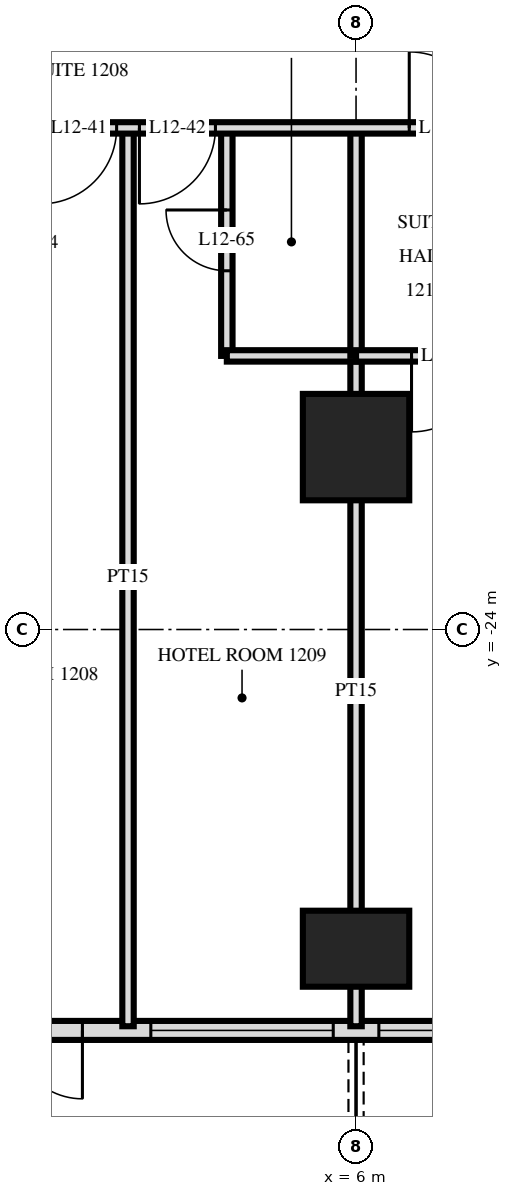
"""IFC4 building model, lengths in metres.
Left out: names, types, materials, properties, quantities, classifications, styles, units other than length and angle.
Written with IfcOpenShell. Run it as: python <this file> out.ifc"""

import sys

from ifc_helpers import new_model, si_unit, direction, frame, frame_2d, origin, origin_2d, place, context, subcontext, project, spatial, rectangle, extrude, element, fill, save


model = new_model("IFC4")
c1 = context("Model", 3, precision=1e-05, world=origin(), true_north=direction((0.0, 1.0)))
c2 = subcontext(c1, "Body", "Model", "MODEL_VIEW")
j1 = project(units=[si_unit("LENGTHUNIT", "METRE"), si_unit("PLANEANGLEUNIT", "RADIAN")], contexts=[c1])
p1 = place(None, origin())
s1 = spatial("IfcSite", under=j1, at=p1, CompositionType="ELEMENT")
p2 = place(p1, origin())
s2 = spatial("IfcBuilding", under=s1, at=p2, CompositionType="ELEMENT")
p3 = place(p2, frame((0.0, 0.0, 52.8)))
s3 = spatial("IfcBuildingStorey", under=s2, at=p3, CompositionType="ELEMENT", Elevation=52.8)
p4 = place(p3, frame((6.0, -28.2, 0.0), z_axis=(0.0, 0.0, 1.0), x_axis=(1.0, 0.0, 0.0)))
e1 = element("IfcColumn", 1, at=p4, inside=s3, PredefinedType="COLUMN", context=c2, shape_type="SweptSolid", body=[
    extrude(rectangle(XDim=1.4, YDim=1.0, at=origin_2d()), origin(), (0.0, 0.0, 1.0), 3.6),
])
p5 = place(p3, frame((6.0, -21.6, 0.0), z_axis=(0.0, 0.0, 1.0), x_axis=(1.0, 0.0, 0.0)))
e2 = element("IfcColumn", 2, at=p5, inside=s3, PredefinedType="COLUMN", context=c2, shape_type="SweptSolid", body=[
    extrude(rectangle(XDim=1.4, YDim=1.4, at=origin_2d()), origin(), (0.0, 0.0, 1.0), 3.6),
])
p6 = place(p3, frame((-28.775, -29.275, 0.0), z_axis=(0.0, 0.0, 1.0), x_axis=(1.0, 0.0, 0.0)))
e3 = element("IfcWall", 3, at=p6, inside=s3, PredefinedType="SOLIDWALL", context=c2, shape_type="SweptSolid", body=[
    extrude(rectangle(XDim=57.551, YDim=0.25, at=frame_2d((28.775, 0.0))), origin(), (0.0, 0.0, 1.0), 3.32),
])
p7 = place(p6, frame((0.575, 0.0, 0.0)))
e4 = element("IfcOpeningElement", 4, at=p7, cuts=e3, PredefinedType="OPENING", context=c2, shape_type="SweptSolid", body=[
    extrude(rectangle(XDim=1.8, YDim=2.4, at=frame_2d((0.9, 1.2))), frame((0.0, 0.135, 0.0), z_axis=(0.0, -1.0, 0.0), x_axis=(1.0, 0.0, 0.0)), (0.0, 0.0, 1.0), 0.27),
])
p8 = place(p6, frame((5.375, 0.0, 0.0)))
e5 = element("IfcOpeningElement", 5, at=p8, cuts=e3, PredefinedType="OPENING", context=c2, shape_type="SweptSolid", body=[
    extrude(rectangle(XDim=1.8, YDim=2.4, at=frame_2d((0.9, 1.2))), frame((0.0, 0.135, 0.0), z_axis=(0.0, -1.0, 0.0), x_axis=(1.0, 0.0, 0.0)), (0.0, 0.0, 1.0), 0.27),
])
p9 = place(p6, frame((8.075, 0.0, 0.3)))
e6 = element("IfcOpeningElement", 6, at=p9, cuts=e3, PredefinedType="OPENING", context=c2, shape_type="SweptSolid", body=[
    extrude(rectangle(XDim=2.4, YDim=2.1, at=frame_2d((1.2, 1.05))), frame((0.0, 0.135, 0.0), z_axis=(0.0, -1.0, 0.0), x_axis=(1.0, 0.0, 0.0)), (0.0, 0.0, 1.0), 0.27),
])
p10 = place(p6, frame((11.375, 0.0, 0.0)))
e7 = element("IfcOpeningElement", 7, at=p10, cuts=e3, PredefinedType="OPENING", context=c2, shape_type="SweptSolid", body=[
    extrude(rectangle(XDim=1.8, YDim=2.4, at=frame_2d((0.9, 1.2))), frame((0.0, 0.135, 0.0), z_axis=(0.0, -1.0, 0.0), x_axis=(1.0, 0.0, 0.0)), (0.0, 0.0, 1.0), 0.27),
])
p11 = place(p6, frame((14.075, 0.0, 0.3)))
e8 = element("IfcOpeningElement", 8, at=p11, cuts=e3, PredefinedType="OPENING", context=c2, shape_type="SweptSolid", body=[
    extrude(rectangle(XDim=2.4, YDim=2.1, at=frame_2d((1.2, 1.05))), frame((0.0, 0.135, 0.0), z_axis=(0.0, -1.0, 0.0), x_axis=(1.0, 0.0, 0.0)), (0.0, 0.0, 1.0), 0.27),
])
p12 = place(p6, frame((17.375, 0.0, 0.0)))
e9 = element("IfcOpeningElement", 9, at=p12, cuts=e3, PredefinedType="OPENING", context=c2, shape_type="SweptSolid", body=[
    extrude(rectangle(XDim=1.8, YDim=2.4, at=frame_2d((0.9, 1.2))), frame((0.0, 0.135, 0.0), z_axis=(0.0, -1.0, 0.0), x_axis=(1.0, 0.0, 0.0)), (0.0, 0.0, 1.0), 0.27),
])
p13 = place(p6, frame((20.075, 0.0, 0.3)))
e10 = element("IfcOpeningElement", 10, at=p13, cuts=e3, PredefinedType="OPENING", context=c2, shape_type="SweptSolid", body=[
    extrude(rectangle(XDim=2.4, YDim=2.1, at=frame_2d((1.2, 1.05))), frame((0.0, 0.135, 0.0), z_axis=(0.0, -1.0, 0.0), x_axis=(1.0, 0.0, 0.0)), (0.0, 0.0, 1.0), 0.27),
])
p14 = place(p6, frame((23.075, 0.0, 0.3)))
e11 = element("IfcOpeningElement", 11, at=p14, cuts=e3, PredefinedType="OPENING", context=c2, shape_type="SweptSolid", body=[
    extrude(rectangle(XDim=2.4, YDim=2.1, at=frame_2d((1.2, 1.05))), frame((0.0, 0.135, 0.0), z_axis=(0.0, -1.0, 0.0), x_axis=(1.0, 0.0, 0.0)), (0.0, 0.0, 1.0), 0.27),
])
p15 = place(p6, frame((26.375, 0.0, 0.0)))
e12 = element("IfcOpeningElement", 12, at=p15, cuts=e3, PredefinedType="OPENING", context=c2, shape_type="SweptSolid", body=[
    extrude(rectangle(XDim=1.8, YDim=2.4, at=frame_2d((0.9, 1.2))), frame((0.0, 0.135, 0.0), z_axis=(0.0, -1.0, 0.0), x_axis=(1.0, 0.0, 0.0)), (0.0, 0.0, 1.0), 0.27),
])
p16 = place(p6, frame((29.375, 0.0, 0.0)))
e13 = element("IfcOpeningElement", 13, at=p16, cuts=e3, PredefinedType="OPENING", context=c2, shape_type="SweptSolid", body=[
    extrude(rectangle(XDim=1.8, YDim=2.4, at=frame_2d((0.9, 1.2))), frame((0.0, 0.135, 0.0), z_axis=(0.0, -1.0, 0.0), x_axis=(1.0, 0.0, 0.0)), (0.0, 0.0, 1.0), 0.27),
])
p17 = place(p6, frame((32.075, 0.0, 0.3)))
e14 = element("IfcOpeningElement", 14, at=p17, cuts=e3, PredefinedType="OPENING", context=c2, shape_type="SweptSolid", body=[
    extrude(rectangle(XDim=2.4, YDim=2.1, at=frame_2d((1.2, 1.05))), frame((0.0, 0.135, 0.0), z_axis=(0.0, -1.0, 0.0), x_axis=(1.0, 0.0, 0.0)), (0.0, 0.0, 1.0), 0.27),
])
p18 = place(p6, frame((35.075, 0.0, 0.3)))
e15 = element("IfcOpeningElement", 15, at=p18, cuts=e3, PredefinedType="OPENING", context=c2, shape_type="SweptSolid", body=[
    extrude(rectangle(XDim=2.4, YDim=2.1, at=frame_2d((1.2, 1.05))), frame((0.0, 0.135, 0.0), z_axis=(0.0, -1.0, 0.0), x_axis=(1.0, 0.0, 0.0)), (0.0, 0.0, 1.0), 0.27),
])
p19 = place(p6, frame((38.375, 0.0, 0.0)))
e16 = element("IfcOpeningElement", 16, at=p19, cuts=e3, PredefinedType="OPENING", context=c2, shape_type="SweptSolid", body=[
    extrude(rectangle(XDim=1.8, YDim=2.4, at=frame_2d((0.9, 1.2))), frame((0.0, 0.135, 0.0), z_axis=(0.0, -1.0, 0.0), x_axis=(1.0, 0.0, 0.0)), (0.0, 0.0, 1.0), 0.27),
])
p20 = place(p6, frame((41.375, 0.0, 0.0)))
e17 = element("IfcOpeningElement", 17, at=p20, cuts=e3, PredefinedType="OPENING", context=c2, shape_type="SweptSolid", body=[
    extrude(rectangle(XDim=1.8, YDim=2.4, at=frame_2d((0.9, 1.2))), frame((0.0, 0.135, 0.0), z_axis=(0.0, -1.0, 0.0), x_axis=(1.0, 0.0, 0.0)), (0.0, 0.0, 1.0), 0.27),
])
p21 = place(p6, frame((44.075, 0.0, 0.3)))
e18 = element("IfcOpeningElement", 18, at=p21, cuts=e3, PredefinedType="OPENING", context=c2, shape_type="SweptSolid", body=[
    extrude(rectangle(XDim=2.4, YDim=2.1, at=frame_2d((1.2, 1.05))), frame((0.0, 0.135, 0.0), z_axis=(0.0, -1.0, 0.0), x_axis=(1.0, 0.0, 0.0)), (0.0, 0.0, 1.0), 0.27),
])
p22 = place(p6, frame((47.075, 0.0, 0.3)))
e19 = element("IfcOpeningElement", 19, at=p22, cuts=e3, PredefinedType="OPENING", context=c2, shape_type="SweptSolid", body=[
    extrude(rectangle(XDim=2.4, YDim=2.1, at=frame_2d((1.2, 1.05))), frame((0.0, 0.135, 0.0), z_axis=(0.0, -1.0, 0.0), x_axis=(1.0, 0.0, 0.0)), (0.0, 0.0, 1.0), 0.27),
])
p23 = place(p6, frame((50.375, 0.0, 0.0)))
e20 = element("IfcOpeningElement", 20, at=p23, cuts=e3, PredefinedType="OPENING", context=c2, shape_type="SweptSolid", body=[
    extrude(rectangle(XDim=1.8, YDim=2.4, at=frame_2d((0.9, 1.2))), frame((0.0, 0.135, 0.0), z_axis=(0.0, -1.0, 0.0), x_axis=(1.0, 0.0, 0.0)), (0.0, 0.0, 1.0), 0.27),
])
p24 = place(p6, frame((53.375, 0.0, 0.0)))
e21 = element("IfcOpeningElement", 21, at=p24, cuts=e3, PredefinedType="OPENING", context=c2, shape_type="SweptSolid", body=[
    extrude(rectangle(XDim=1.8, YDim=2.4, at=frame_2d((0.9, 1.2))), frame((0.0, 0.135, 0.0), z_axis=(0.0, -1.0, 0.0), x_axis=(1.0, 0.0, 0.0)), (0.0, 0.0, 1.0), 0.27),
])
p25 = place(p3, frame((6.0, -20.4, 0.0), z_axis=(0.0, 0.0, 1.0), x_axis=(0.0, 1.0, 0.0)))
e22 = element("IfcWall", 22, at=p25, inside=s3, PredefinedType="PARTITIONING", context=c2, shape_type="SweptSolid", body=[
    extrude(rectangle(XDim=3.0, YDim=0.15, at=frame_2d((1.5, 0.0))), origin(), (0.0, 0.0, 1.0), 3.32),
])
p26 = place(p3, frame((6.0, -29.22, 0.0), z_axis=(0.0, 0.0, 1.0), x_axis=(0.0, 1.0, 0.0)))
e23 = element("IfcWall", 23, at=p26, inside=s3, PredefinedType="PARTITIONING", context=c2, shape_type="SweptSolid", body=[
    extrude(rectangle(XDim=8.82, YDim=0.15, at=frame_2d((4.41, 0.0))), origin(), (0.0, 0.0, 1.0), 3.32),
])
p27 = place(p3, frame((4.3, -20.4, 0.0), z_axis=(0.0, 0.0, 1.0), x_axis=(0.0, 1.0, 0.0)))
e24 = element("IfcWall", 24, at=p27, inside=s3, PredefinedType="PARTITIONING", context=c2, shape_type="SweptSolid", body=[
    extrude(rectangle(XDim=3.0, YDim=0.15, at=frame_2d((1.5, 0.0))), origin(), (0.0, 0.0, 1.0), 3.32),
])
p28 = place(p27, frame((1.12, 0.0, 0.0)))
e25 = element("IfcOpeningElement", 25, at=p28, cuts=e24, PredefinedType="OPENING", context=c2, shape_type="SweptSolid", body=[
    extrude(rectangle(XDim=0.8, YDim=2.1, at=frame_2d((0.4, 1.05))), frame((0.0, 0.085, 0.0), z_axis=(0.0, -1.0, 0.0), x_axis=(1.0, 0.0, 0.0)), (0.0, 0.0, 1.0), 0.17),
])
p29 = place(p3, frame((3.0, -29.22, 0.0), z_axis=(0.0, 0.0, 1.0), x_axis=(0.0, 1.0, 0.0)))
e26 = element("IfcWall", 26, at=p29, inside=s3, PredefinedType="PARTITIONING", context=c2, shape_type="SweptSolid", body=[
    extrude(rectangle(XDim=11.82, YDim=0.15, at=frame_2d((5.91, 0.0))), origin(), (0.0, 0.0, 1.0), 3.32),
])
p30 = place(p3, frame((6.0, -20.4, 0.0), z_axis=(0.0, 0.0, 1.0), x_axis=(1.0, 0.0, 0.0)))
e27 = element("IfcWall", 27, at=p30, inside=s3, PredefinedType="PARTITIONING", context=c2, shape_type="SweptSolid", body=[
    extrude(rectangle(XDim=2.4, YDim=0.15, at=frame_2d((1.2, 0.0))), origin(), (0.0, 0.0, 1.0), 3.32),
])
p31 = place(p30, frame((0.73, 0.0, 0.0)))
e28 = element("IfcOpeningElement", 28, at=p31, cuts=e27, PredefinedType="OPENING", context=c2, shape_type="SweptSolid", body=[
    extrude(rectangle(XDim=1.0, YDim=2.1, at=frame_2d((0.5, 1.05))), frame((0.0, 0.085, 0.0), z_axis=(0.0, -1.0, 0.0), x_axis=(1.0, 0.0, 0.0)), (0.0, 0.0, 1.0), 0.17),
])
p32 = place(p3, frame((4.3, -20.4, 0.0), z_axis=(0.0, 0.0, 1.0), x_axis=(1.0, 0.0, 0.0)))
e29 = element("IfcWall", 29, at=p32, inside=s3, PredefinedType="PARTITIONING", context=c2, shape_type="SweptSolid", body=[
    extrude(rectangle(XDim=1.7, YDim=0.15, at=frame_2d((0.85, 0.0))), origin(), (0.0, 0.0, 1.0), 3.32),
])
p33 = place(p3, frame((-33.12, -17.4, 0.0), z_axis=(0.0, 0.0, 1.0), x_axis=(1.0, 0.0, 0.0)))
e30 = element("IfcWall", 30, at=p33, inside=s3, PredefinedType="PARTITIONING", context=c2, shape_type="SweptSolid", body=[
    extrude(rectangle(XDim=66.24, YDim=0.15, at=frame_2d((33.12, 0.0))), origin(), (0.0, 0.0, 1.0), 3.32),
])
p34 = place(p33, frame((9.27, 0.0, 0.0)))
e31 = element("IfcOpeningElement", 31, at=p34, cuts=e30, PredefinedType="OPENING", context=c2, shape_type="SweptSolid", body=[
    extrude(rectangle(XDim=1.0, YDim=2.1, at=frame_2d((0.5, 1.05))), frame((0.0, 0.085, 0.0), z_axis=(0.0, -1.0, 0.0), x_axis=(1.0, 0.0, 0.0)), (0.0, 0.0, 1.0), 0.17),
])
p35 = place(p33, frame((13.97, 0.0, 0.0)))
e32 = element("IfcOpeningElement", 32, at=p35, cuts=e30, PredefinedType="OPENING", context=c2, shape_type="SweptSolid", body=[
    extrude(rectangle(XDim=1.0, YDim=2.1, at=frame_2d((0.5, 1.05))), frame((0.0, 0.085, 0.0), z_axis=(0.0, -1.0, 0.0), x_axis=(1.0, 0.0, 0.0)), (0.0, 0.0, 1.0), 0.17),
])
p36 = place(p33, frame((15.27, 0.0, 0.0)))
e33 = element("IfcOpeningElement", 33, at=p36, cuts=e30, PredefinedType="OPENING", context=c2, shape_type="SweptSolid", body=[
    extrude(rectangle(XDim=1.0, YDim=2.1, at=frame_2d((0.5, 1.05))), frame((0.0, 0.085, 0.0), z_axis=(0.0, -1.0, 0.0), x_axis=(1.0, 0.0, 0.0)), (0.0, 0.0, 1.0), 0.17),
])
p37 = place(p33, frame((19.97, 0.0, 0.0)))
e34 = element("IfcOpeningElement", 34, at=p37, cuts=e30, PredefinedType="OPENING", context=c2, shape_type="SweptSolid", body=[
    extrude(rectangle(XDim=1.0, YDim=2.1, at=frame_2d((0.5, 1.05))), frame((0.0, 0.085, 0.0), z_axis=(0.0, -1.0, 0.0), x_axis=(1.0, 0.0, 0.0)), (0.0, 0.0, 1.0), 0.17),
])
p38 = place(p33, frame((22.27, 0.0, 0.0)))
e35 = element("IfcOpeningElement", 35, at=p38, cuts=e30, PredefinedType="OPENING", context=c2, shape_type="SweptSolid", body=[
    extrude(rectangle(XDim=1.0, YDim=2.1, at=frame_2d((0.5, 1.05))), frame((0.0, 0.085, 0.0), z_axis=(0.0, -1.0, 0.0), x_axis=(1.0, 0.0, 0.0)), (0.0, 0.0, 1.0), 0.17),
])
p39 = place(p33, frame((28.97, 0.0, 0.0)))
e36 = element("IfcOpeningElement", 36, at=p39, cuts=e30, PredefinedType="OPENING", context=c2, shape_type="SweptSolid", body=[
    extrude(rectangle(XDim=1.0, YDim=2.1, at=frame_2d((0.5, 1.05))), frame((0.0, 0.085, 0.0), z_axis=(0.0, -1.0, 0.0), x_axis=(1.0, 0.0, 0.0)), (0.0, 0.0, 1.0), 0.17),
])
p40 = place(p33, frame((30.27, 0.0, 0.0)))
e37 = element("IfcOpeningElement", 37, at=p40, cuts=e30, PredefinedType="OPENING", context=c2, shape_type="SweptSolid", body=[
    extrude(rectangle(XDim=1.0, YDim=2.1, at=frame_2d((0.5, 1.05))), frame((0.0, 0.085, 0.0), z_axis=(0.0, -1.0, 0.0), x_axis=(1.0, 0.0, 0.0)), (0.0, 0.0, 1.0), 0.17),
])
p41 = place(p33, frame((34.97, 0.0, 0.0)))
e38 = element("IfcOpeningElement", 38, at=p41, cuts=e30, PredefinedType="OPENING", context=c2, shape_type="SweptSolid", body=[
    extrude(rectangle(XDim=1.0, YDim=2.1, at=frame_2d((0.5, 1.05))), frame((0.0, 0.085, 0.0), z_axis=(0.0, -1.0, 0.0), x_axis=(1.0, 0.0, 0.0)), (0.0, 0.0, 1.0), 0.17),
])
p42 = place(p33, frame((36.27, 0.0, 0.0)))
e39 = element("IfcOpeningElement", 39, at=p42, cuts=e30, PredefinedType="OPENING", context=c2, shape_type="SweptSolid", body=[
    extrude(rectangle(XDim=1.0, YDim=2.1, at=frame_2d((0.5, 1.05))), frame((0.0, 0.085, 0.0), z_axis=(0.0, -1.0, 0.0), x_axis=(1.0, 0.0, 0.0)), (0.0, 0.0, 1.0), 0.17),
])
p43 = place(p33, frame((39.82, 0.0, 0.0)))
e40 = element("IfcOpeningElement", 40, at=p43, cuts=e30, PredefinedType="OPENING", context=c2, shape_type="SweptSolid", body=[
    extrude(rectangle(XDim=1.0, YDim=2.1, at=frame_2d((0.5, 1.05))), frame((0.0, 0.085, 0.0), z_axis=(0.0, -1.0, 0.0), x_axis=(1.0, 0.0, 0.0)), (0.0, 0.0, 1.0), 0.17),
])
p44 = place(p33, frame((51.27, 0.0, 0.0)))
e41 = element("IfcOpeningElement", 41, at=p44, cuts=e30, PredefinedType="OPENING", context=c2, shape_type="SweptSolid", body=[
    extrude(rectangle(XDim=1.0, YDim=2.1, at=frame_2d((0.5, 1.05))), frame((0.0, 0.085, 0.0), z_axis=(0.0, -1.0, 0.0), x_axis=(1.0, 0.0, 0.0)), (0.0, 0.0, 1.0), 0.17),
])
p45 = place(p33, frame((4.42, 0.0, 0.0)))
e42 = element("IfcOpeningElement", 42, at=p45, cuts=e30, PredefinedType="OPENING", context=c2, shape_type="SweptSolid", body=[
    extrude(rectangle(XDim=1.0, YDim=2.1, at=frame_2d((0.5, 1.05))), frame((0.0, 0.085, 0.0), z_axis=(0.0, -1.0, 0.0), x_axis=(1.0, 0.0, 0.0)), (0.0, 0.0, 1.0), 0.17),
])
p46 = place(p33, frame((54.82, 0.0, 0.0)))
e43 = element("IfcOpeningElement", 43, at=p46, cuts=e30, PredefinedType="OPENING", context=c2, shape_type="SweptSolid", body=[
    extrude(rectangle(XDim=1.0, YDim=2.1, at=frame_2d((0.5, 1.05))), frame((0.0, 0.085, 0.0), z_axis=(0.0, -1.0, 0.0), x_axis=(1.0, 0.0, 0.0)), (0.0, 0.0, 1.0), 0.17),
])
p47 = place(p16, frame((0.9, 0.0, 0.0), z_axis=(0.0, 0.0, 1.0), x_axis=(-1.0, 0.0, 0.0)))
e44 = element("IfcDoor", 44, at=p47, inside=s3, OperationType="DOUBLE_DOOR_SINGLE_SWING", PredefinedType="DOOR", context=c2, shape_type="SweptSolid", body=[
    extrude(rectangle(XDim=1.8, YDim=2.4, at=frame_2d((0.0, 1.2))), frame((0.0, -0.025, 0.0), z_axis=(0.0, 1.0, 0.0), x_axis=(-1.0, 0.0, 0.0)), (0.0, 0.0, 1.0), 0.05),
])
fill(e13, e44)
p48 = place(p17, origin())
e45 = element("IfcWindow", 45, at=p48, inside=s3, PartitioningType="SINGLE_PANEL", PredefinedType="WINDOW", context=c2, shape_type="SweptSolid", body=[
    extrude(rectangle(XDim=2.4, YDim=2.1, at=frame_2d((1.2, 1.05))), frame((0.0, 0.03, 0.0), z_axis=(0.0, -1.0, 0.0), x_axis=(1.0, 0.0, 0.0)), (0.0, 0.0, 1.0), 0.06),
])
fill(e14, e45)
p49 = place(p18, origin())
e46 = element("IfcWindow", 46, at=p49, inside=s3, PartitioningType="SINGLE_PANEL", PredefinedType="WINDOW", context=c2, shape_type="SweptSolid", body=[
    extrude(rectangle(XDim=2.4, YDim=2.1, at=frame_2d((1.2, 1.05))), frame((0.0, 0.03, 0.0), z_axis=(0.0, -1.0, 0.0), x_axis=(1.0, 0.0, 0.0)), (0.0, 0.0, 1.0), 0.06),
])
fill(e15, e46)
p50 = place(p41, frame((0.5, 0.0, 0.0), z_axis=(0.0, 0.0, 1.0), x_axis=(-1.0, 0.0, 0.0)))
e47 = element("IfcDoor", 47, at=p50, inside=s3, OperationType="SINGLE_SWING_LEFT", PredefinedType="DOOR", context=c2, shape_type="SweptSolid", body=[
    extrude(rectangle(XDim=1.0, YDim=2.1, at=frame_2d((0.0, 1.05))), frame((0.0, -0.025, 0.0), z_axis=(0.0, 1.0, 0.0), x_axis=(-1.0, 0.0, 0.0)), (0.0, 0.0, 1.0), 0.05),
])
fill(e38, e47)
p51 = place(p42, frame((0.5, 0.0, 0.0), z_axis=(0.0, 0.0, 1.0), x_axis=(-1.0, 0.0, 0.0)))
e48 = element("IfcDoor", 48, at=p51, inside=s3, OperationType="SINGLE_SWING_LEFT", PredefinedType="DOOR", context=c2, shape_type="SweptSolid", body=[
    extrude(rectangle(XDim=1.0, YDim=2.1, at=frame_2d((0.0, 1.05))), frame((0.0, -0.025, 0.0), z_axis=(0.0, 1.0, 0.0), x_axis=(-1.0, 0.0, 0.0)), (0.0, 0.0, 1.0), 0.05),
])
fill(e39, e48)
p52 = place(p43, origin())
e49 = element("IfcDoor", 49, at=p52, inside=s3, OperationType="SINGLE_SWING_RIGHT", PredefinedType="DOOR", context=c2, shape_type="SweptSolid", body=[
    extrude(rectangle(XDim=1.0, YDim=2.1, at=frame_2d((0.5, 1.05))), frame((0.0, 0.025, 0.0), z_axis=(0.0, -1.0, 0.0), x_axis=(1.0, 0.0, 0.0)), (0.0, 0.0, 1.0), 0.05),
])
fill(e40, e49)
p53 = place(p28, origin())
e50 = element("IfcDoor", 50, at=p53, inside=s3, OperationType="SINGLE_SWING_LEFT", PredefinedType="DOOR", context=c2, shape_type="SweptSolid", body=[
    extrude(rectangle(XDim=0.8, YDim=2.1, at=frame_2d((0.4, 1.05))), frame((0.0, 0.025, 0.0), z_axis=(0.0, -1.0, 0.0), x_axis=(1.0, 0.0, 0.0)), (0.0, 0.0, 1.0), 0.05),
])
fill(e25, e50)
p54 = place(p31, frame((0.5, 0.0, 0.0), z_axis=(0.0, 0.0, 1.0), x_axis=(-1.0, 0.0, 0.0)))
e51 = element("IfcDoor", 51, at=p54, inside=s3, OperationType="SINGLE_SWING_LEFT", PredefinedType="DOOR", context=c2, shape_type="SweptSolid", body=[
    extrude(rectangle(XDim=1.0, YDim=2.1, at=frame_2d((0.0, 1.05))), frame((0.0, -0.025, 0.0), z_axis=(0.0, 1.0, 0.0), x_axis=(-1.0, 0.0, 0.0)), (0.0, 0.0, 1.0), 0.05),
])
fill(e28, e51)
save(model, sys.argv[1])
